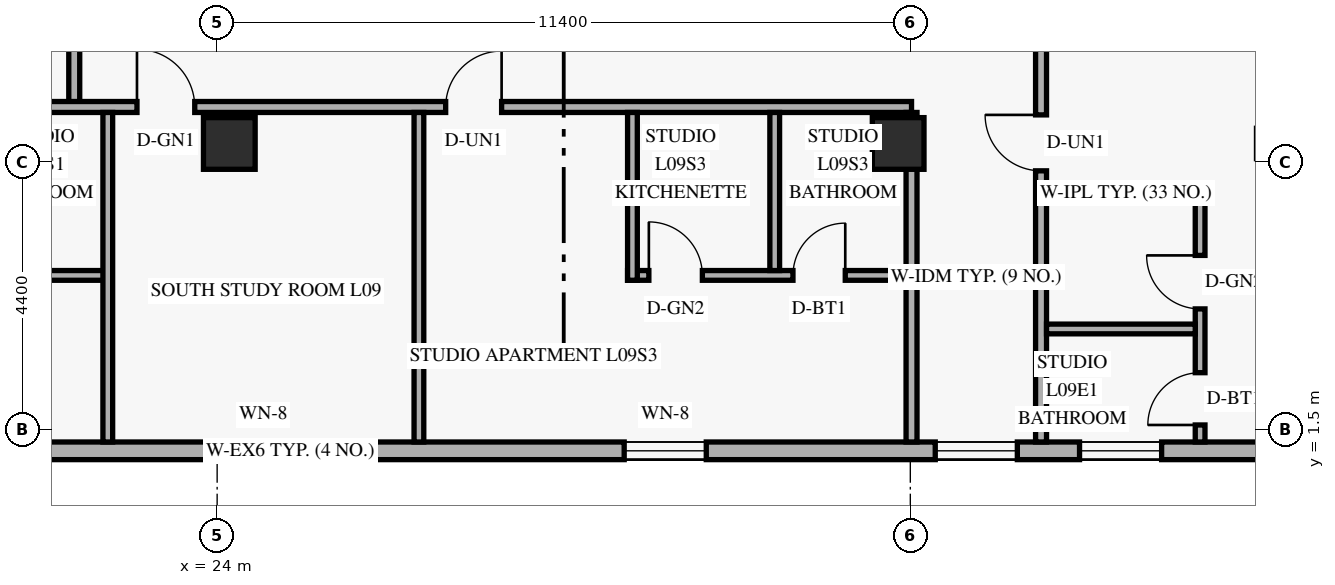
"""IFC4 building model, lengths in metres.
Left out: names, types, materials, properties, quantities, classifications, styles, units other than length and angle.
Written with IfcOpenShell. Run it as: python <this file> out.ifc"""

import sys

from ifc_helpers import new_model, si_unit, direction, frame, frame_2d, origin, origin_2d, place, context, subcontext, project, spatial, rectangle, hollow_rectangle, extrude, element, fill, save


model = new_model("IFC4")
c1 = context("Model", 3, precision=1e-05, world=origin(), true_north=direction((0.0, 1.0)))
c2 = subcontext(c1, "Body", "Model", "MODEL_VIEW")
j1 = project(units=[si_unit("LENGTHUNIT", "METRE"), si_unit("PLANEANGLEUNIT", "RADIAN")], contexts=[c1])
p1 = place(None, origin())
s1 = spatial("IfcSite", under=j1, at=p1, CompositionType="ELEMENT")
p2 = place(p1, origin())
s2 = spatial("IfcBuilding", under=s1, at=p2, CompositionType="ELEMENT")
p3 = place(p2, frame((0.0, 0.0, 38.4)))
s3 = spatial("IfcBuildingStorey", under=s2, at=p3, CompositionType="ELEMENT", Elevation=38.4)
for number, where, z_axis, x_axis in (
    (1, (24.2, 6.2, 0.0), (0.0, 0.0, 1.0), (1.0, 0.0, 0.0)),
    (2, (35.2, 6.2, 0.0), (0.0, 0.0, 1.0), (1.0, 0.0, 0.0)),
):
    element("IfcColumn", number, at=place(p3, frame(where, z_axis=z_axis, x_axis=x_axis)), inside=s3, PredefinedType="COLUMN", context=c2, shape_type="SweptSolid", body=[
        extrude(rectangle(XDim=0.85, YDim=0.85, at=origin_2d()), origin(), (0.0, 0.0, 1.0), 3.6),
    ])
p4 = place(p3, frame((41.28, 6.2, 0.0), z_axis=(0.034971136209, 0.0, 0.999388322742), x_axis=(0.0, 1.0, 0.0)))
e3 = element("IfcColumn", 3, at=p4, inside=s3, PredefinedType="COLUMN", context=c2, shape_type="SweptSolid", body=[
    extrude(hollow_rectangle(XDim=0.5, YDim=0.5, WallThickness=0.022, at=origin_2d()), origin(), (0.0, 0.0, 1.0), 3.602),
])
p5 = place(p3, frame((5.42, 1.145, 0.0), z_axis=(0.0, 0.0, 1.0), x_axis=(1.0, 0.0, 0.0)))
e4 = element("IfcWall", 4, at=p5, inside=s3, PredefinedType="SOLIDWALL", context=c2, shape_type="SweptSolid", body=[
    extrude(rectangle(XDim=39.56, YDim=0.29, at=frame_2d((19.78, 0.0))), origin(), (0.0, 0.0, 1.0), 3.36),
])
p6 = place(p5, frame((2.765, 0.0, 0.85)))
e5 = element("IfcOpeningElement", 5, at=p6, cuts=e4, PredefinedType="OPENING", context=c2, shape_type="SweptSolid", body=[
    extrude(rectangle(XDim=1.35, YDim=1.55, at=frame_2d((0.675, 0.775))), frame((0.0, 0.155, 0.0), z_axis=(0.0, -1.0, 0.0), x_axis=(1.0, 0.0, 0.0)), (0.0, 0.0, 1.0), 0.31),
])
p7 = place(p5, frame((7.18, 0.0, 0.85)))
e6 = element("IfcOpeningElement", 6, at=p7, cuts=e4, PredefinedType="OPENING", context=c2, shape_type="SweptSolid", body=[
    extrude(rectangle(XDim=1.2, YDim=1.5, at=frame_2d((0.6, 0.75))), frame((0.0, 0.155, 0.0), z_axis=(0.0, -1.0, 0.0), x_axis=(1.0, 0.0, 0.0)), (0.0, 0.0, 1.0), 0.31),
])
p8 = place(p5, frame((12.056, 0.0, 0.85)))
e7 = element("IfcOpeningElement", 7, at=p8, cuts=e4, PredefinedType="OPENING", context=c2, shape_type="SweptSolid", body=[
    extrude(rectangle(XDim=1.35, YDim=1.55, at=frame_2d((0.675, 0.775))), frame((0.0, 0.155, 0.0), z_axis=(0.0, -1.0, 0.0), x_axis=(1.0, 0.0, 0.0)), (0.0, 0.0, 1.0), 0.31),
])
p9 = place(p5, frame((18.665, 0.0, 0.85)))
e8 = element("IfcOpeningElement", 8, at=p9, cuts=e4, PredefinedType="OPENING", context=c2, shape_type="SweptSolid", body=[
    extrude(rectangle(XDim=1.35, YDim=1.55, at=frame_2d((0.675, 0.775))), frame((0.0, 0.155, 0.0), z_axis=(0.0, -1.0, 0.0), x_axis=(1.0, 0.0, 0.0)), (0.0, 0.0, 1.0), 0.31),
])
p10 = place(p5, frame((25.274, 0.0, 0.85)))
e9 = element("IfcOpeningElement", 9, at=p10, cuts=e4, PredefinedType="OPENING", context=c2, shape_type="SweptSolid", body=[
    extrude(rectangle(XDim=1.35, YDim=1.55, at=frame_2d((0.675, 0.775))), frame((0.0, 0.155, 0.0), z_axis=(0.0, -1.0, 0.0), x_axis=(1.0, 0.0, 0.0)), (0.0, 0.0, 1.0), 0.31),
])
p11 = place(p5, frame((30.39, 0.0, 0.85)))
e10 = element("IfcOpeningElement", 10, at=p11, cuts=e4, PredefinedType="OPENING", context=c2, shape_type="SweptSolid", body=[
    extrude(rectangle(XDim=1.35, YDim=1.55, at=frame_2d((0.675, 0.775))), frame((0.0, 0.155, 0.0), z_axis=(0.0, -1.0, 0.0), x_axis=(1.0, 0.0, 0.0)), (0.0, 0.0, 1.0), 0.31),
])
p12 = place(p5, frame((32.763, 0.0, 0.85)))
e11 = element("IfcOpeningElement", 11, at=p12, cuts=e4, PredefinedType="OPENING", context=c2, shape_type="SweptSolid", body=[
    extrude(rectangle(XDim=1.35, YDim=1.55, at=frame_2d((0.675, 0.775))), frame((0.0, 0.155, 0.0), z_axis=(0.0, -1.0, 0.0), x_axis=(1.0, 0.0, 0.0)), (0.0, 0.0, 1.0), 0.31),
])
p13 = place(p5, frame((36.478, 0.0, 0.85)))
e12 = element("IfcOpeningElement", 12, at=p13, cuts=e4, PredefinedType="OPENING", context=c2, shape_type="SweptSolid", body=[
    extrude(rectangle(XDim=1.35, YDim=1.55, at=frame_2d((0.675, 0.775))), frame((0.0, 0.155, 0.0), z_axis=(0.0, -1.0, 0.0), x_axis=(1.0, 0.0, 0.0)), (0.0, 0.0, 1.0), 0.31),
])
p14 = place(p3, frame((37.55, 1.29, 0.0), z_axis=(0.0, 0.0, 1.0), x_axis=(0.0, 1.0, 0.0)))
e13 = element("IfcWall", 13, at=p14, inside=s3, PredefinedType="STANDARD", context=c2, shape_type="SweptSolid", body=[
    extrude(rectangle(XDim=45.42, YDim=0.18, at=frame_2d((22.71, 0.0))), origin(), (0.0, 0.0, 1.0), 2.649),
])
p15 = place(p14, frame((4.46, 0.0, 0.0)))
e14 = element("IfcOpeningElement", 14, at=p15, cuts=e13, PredefinedType="OPENING", context=c2, shape_type="SweptSolid", body=[
    extrude(rectangle(XDim=0.92, YDim=2.15, at=frame_2d((0.46, 1.075))), frame((0.0, 0.1, 0.0), z_axis=(0.0, -1.0, 0.0), x_axis=(1.0, 0.0, 0.0)), (0.0, 0.0, 1.0), 0.2),
])
p16 = place(p14, frame((15.907, 0.0, 0.0)))
e15 = element("IfcOpeningElement", 15, at=p16, cuts=e13, PredefinedType="OPENING", context=c2, shape_type="SweptSolid", body=[
    extrude(rectangle(XDim=0.92, YDim=2.15, at=frame_2d((0.46, 1.075))), frame((0.0, 0.1, 0.0), z_axis=(0.0, -1.0, 0.0), x_axis=(1.0, 0.0, 0.0)), (0.0, 0.0, 1.0), 0.2),
])
p17 = place(p14, frame((28.23, 0.0, 0.0)))
e16 = element("IfcOpeningElement", 16, at=p17, cuts=e13, PredefinedType="OPENING", context=c2, shape_type="SweptSolid", body=[
    extrude(rectangle(XDim=0.92, YDim=2.15, at=frame_2d((0.46, 1.075))), frame((0.0, 0.1, 0.0), z_axis=(0.0, -1.0, 0.0), x_axis=(1.0, 0.0, 0.0)), (0.0, 0.0, 1.0), 0.2),
])
p18 = place(p14, frame((40.02, 0.0, 0.0)))
e17 = element("IfcOpeningElement", 17, at=p18, cuts=e13, PredefinedType="OPENING", context=c2, shape_type="SweptSolid", body=[
    extrude(rectangle(XDim=0.92, YDim=2.15, at=frame_2d((0.46, 1.075))), frame((0.0, 0.1, 0.0), z_axis=(0.0, -1.0, 0.0), x_axis=(1.0, 0.0, 0.0)), (0.0, 0.0, 1.0), 0.2),
])
p19 = place(p3, frame((21.65, 6.8, 0.0), z_axis=(0.0, 0.0, 1.0), x_axis=(0.0, 1.0, 0.0)))
e18 = element("IfcWall", 18, at=p19, inside=s3, PredefinedType="STANDARD", context=c2, shape_type="SweptSolid", body=[
    extrude(rectangle(XDim=34.4, YDim=0.18, at=frame_2d((17.2, 0.0))), origin(), (0.0, 0.0, 1.0), 2.649),
])
p20 = place(p3, frame((14.1, 6.8, 0.0), z_axis=(0.0, 0.0, 1.0), x_axis=(1.0, 0.0, 0.0)))
e19 = element("IfcWall", 19, at=p20, inside=s3, PredefinedType="STANDARD", context=c2, shape_type="SweptSolid", body=[
    extrude(rectangle(XDim=21.32, YDim=0.18, at=frame_2d((10.66, 0.0))), origin(), (0.0, 0.0, 1.0), 2.649),
])
p21 = place(p20, frame((0.44, 0.0, 0.0)))
e20 = element("IfcOpeningElement", 20, at=p21, cuts=e19, PredefinedType="OPENING", context=c2, shape_type="SweptSolid", body=[
    extrude(rectangle(XDim=0.92, YDim=2.15, at=frame_2d((0.46, 1.075))), frame((0.0, 0.1, 0.0), z_axis=(0.0, -1.0, 0.0), x_axis=(1.0, 0.0, 0.0)), (0.0, 0.0, 1.0), 0.2),
])
p22 = place(p20, frame((8.582, 0.0, 0.0)))
e21 = element("IfcOpeningElement", 21, at=p22, cuts=e19, PredefinedType="OPENING", context=c2, shape_type="SweptSolid", body=[
    extrude(rectangle(XDim=0.95, YDim=2.15, at=frame_2d((0.475, 1.075))), frame((0.0, 0.1, 0.0), z_axis=(0.0, -1.0, 0.0), x_axis=(1.0, 0.0, 0.0)), (0.0, 0.0, 1.0), 0.2),
])
p23 = place(p20, frame((13.658, 0.0, 0.0)))
e22 = element("IfcOpeningElement", 22, at=p23, cuts=e19, PredefinedType="OPENING", context=c2, shape_type="SweptSolid", body=[
    extrude(rectangle(XDim=0.92, YDim=2.15, at=frame_2d((0.46, 1.075))), frame((0.0, 0.1, 0.0), z_axis=(0.0, -1.0, 0.0), x_axis=(1.0, 0.0, 0.0)), (0.0, 0.0, 1.0), 0.2),
])
p24 = place(p3, frame((35.42, 1.29, 0.0), z_axis=(0.0, 0.0, 1.0), x_axis=(0.0, 1.0, 0.0)))
e23 = element("IfcWall", 23, at=p24, inside=s3, PredefinedType="PARTITIONING", context=c2, shape_type="SweptSolid", body=[
    extrude(rectangle(XDim=5.42, YDim=0.18, at=frame_2d((2.71, 0.0))), origin(), (0.0, 0.0, 1.0), 3.36),
])
p25 = place(p3, frame((37.64, 5.39, 0.0), z_axis=(0.0, 0.0, 1.0), x_axis=(1.0, 0.0, 0.0)))
e24 = element("IfcWall", 24, at=p25, inside=s3, PredefinedType="PLUMBINGWALL", context=c2, shape_type="SweptSolid", body=[
    extrude(rectangle(XDim=2.606, YDim=0.16, at=frame_2d((1.303, 0.0))), origin(), (0.0, 0.0, 1.0), 3.36),
])
p26 = place(p3, frame((40.166, 1.29, 0.0), z_axis=(0.0, 0.0, 1.0), x_axis=(0.0, 1.0, 0.0)))
e25 = element("IfcWall", 25, at=p26, inside=s3, PredefinedType="PLUMBINGWALL", context=c2, shape_type="SweptSolid", body=[
    extrude(rectangle(XDim=4.19, YDim=0.16, at=frame_2d((2.095, 0.0))), origin(), (0.0, 0.0, 1.0), 3.36),
])
p27 = place(p26, frame((0.28, 0.0, 0.0)))
e26 = element("IfcOpeningElement", 26, at=p27, cuts=e25, PredefinedType="OPENING", context=c2, shape_type="SweptSolid", body=[
    extrude(rectangle(XDim=0.86, YDim=2.12, at=frame_2d((0.43, 1.06))), frame((0.0, 0.09, 0.0), z_axis=(0.0, -1.0, 0.0), x_axis=(1.0, 0.0, 0.0)), (0.0, 0.0, 1.0), 0.18),
])
p28 = place(p26, frame((2.189, 0.0, 0.0)))
e27 = element("IfcOpeningElement", 27, at=p28, cuts=e25, PredefinedType="OPENING", context=c2, shape_type="SweptSolid", body=[
    extrude(rectangle(XDim=0.88, YDim=2.12, at=frame_2d((0.44, 1.06))), frame((0.0, 0.09, 0.0), z_axis=(0.0, -1.0, 0.0), x_axis=(1.0, 0.0, 0.0)), (0.0, 0.0, 1.0), 0.18),
])
p29 = place(p3, frame((37.64, 3.149, 0.0), z_axis=(0.0, 0.0, 1.0), x_axis=(1.0, 0.0, 0.0)))
e28 = element("IfcWall", 28, at=p29, inside=s3, PredefinedType="PLUMBINGWALL", context=c2, shape_type="SweptSolid", body=[
    extrude(rectangle(XDim=2.446, YDim=0.16, at=frame_2d((1.223, 0.0))), origin(), (0.0, 0.0, 1.0), 3.36),
])
p30 = place(p3, frame((17.531, 4.03, 0.0), z_axis=(0.0, 0.0, 1.0), x_axis=(1.0, 0.0, 0.0)))
e29 = element("IfcWall", 29, at=p30, inside=s3, PredefinedType="PLUMBINGWALL", context=c2, shape_type="SweptSolid", body=[
    extrude(rectangle(XDim=4.67, YDim=0.16, at=frame_2d((2.335, 0.0))), origin(), (0.0, 0.0, 1.0), 3.36),
])
p31 = place(p30, frame((0.35, 0.0, 0.0)))
e30 = element("IfcOpeningElement", 30, at=p31, cuts=e29, PredefinedType="OPENING", context=c2, shape_type="SweptSolid", body=[
    extrude(rectangle(XDim=0.88, YDim=2.12, at=frame_2d((0.44, 1.06))), frame((0.0, 0.09, 0.0), z_axis=(0.0, -1.0, 0.0), x_axis=(1.0, 0.0, 0.0)), (0.0, 0.0, 1.0), 0.18),
])
p32 = place(p30, frame((2.72, 0.0, 0.0)))
e31 = element("IfcOpeningElement", 31, at=p32, cuts=e29, PredefinedType="OPENING", context=c2, shape_type="SweptSolid", body=[
    extrude(rectangle(XDim=0.86, YDim=2.12, at=frame_2d((0.43, 1.06))), frame((0.0, 0.09, 0.0), z_axis=(0.0, -1.0, 0.0), x_axis=(1.0, 0.0, 0.0)), (0.0, 0.0, 1.0), 0.18),
])
for number, where, z_axis, x_axis in (
    (32, (22.202, 1.29, 0.0), (0.0, 0.0, 1.0), (0.0, 1.0, 0.0)),
    (33, (27.318, 1.29, 0.0), (0.0, 0.0, 1.0), (0.0, 1.0, 0.0)),
):
    element("IfcWall", number, at=place(p3, frame(where, z_axis=z_axis, x_axis=x_axis)), inside=s3, PredefinedType="PARTITIONING", context=c2, shape_type="SweptSolid", body=[
        extrude(rectangle(XDim=5.42, YDim=0.16, at=frame_2d((2.71, 0.0))), origin(), (0.0, 0.0, 1.0), 2.809),
    ])
p33 = place(p3, frame((30.75, 4.03, 0.0), z_axis=(0.0, 0.0, 1.0), x_axis=(1.0, 0.0, 0.0)))
e34 = element("IfcWall", 34, at=p33, inside=s3, PredefinedType="PLUMBINGWALL", context=c2, shape_type="SweptSolid", body=[
    extrude(rectangle(XDim=4.58, YDim=0.16, at=frame_2d((2.29, 0.0))), origin(), (0.0, 0.0, 1.0), 3.36),
])
p34 = place(p33, frame((0.35, 0.0, 0.0)))
e35 = element("IfcOpeningElement", 35, at=p34, cuts=e34, PredefinedType="OPENING", context=c2, shape_type="SweptSolid", body=[
    extrude(rectangle(XDim=0.88, YDim=2.12, at=frame_2d((0.44, 1.06))), frame((0.0, 0.09, 0.0), z_axis=(0.0, -1.0, 0.0), x_axis=(1.0, 0.0, 0.0)), (0.0, 0.0, 1.0), 0.18),
])
p35 = place(p33, frame((2.72, 0.0, 0.0)))
e36 = element("IfcOpeningElement", 36, at=p35, cuts=e34, PredefinedType="OPENING", context=c2, shape_type="SweptSolid", body=[
    extrude(rectangle(XDim=0.86, YDim=2.12, at=frame_2d((0.43, 1.06))), frame((0.0, 0.09, 0.0), z_axis=(0.0, -1.0, 0.0), x_axis=(1.0, 0.0, 0.0)), (0.0, 0.0, 1.0), 0.18),
])
p36 = place(p3, frame((30.83, 3.95, 0.0), z_axis=(0.0, 0.0, 1.0), x_axis=(0.0, 1.0, 0.0)))
e37 = element("IfcWall", 37, at=p36, inside=s3, PredefinedType="PLUMBINGWALL", context=c2, shape_type="SweptSolid", body=[
    extrude(rectangle(XDim=2.76, YDim=0.16, at=frame_2d((1.38, 0.0))), origin(), (0.0, 0.0, 1.0), 2.809),
])
p37 = place(p3, frame((33.17, 4.11, 0.0), z_axis=(0.0, 0.0, 1.0), x_axis=(0.0, 1.0, 0.0)))
e38 = element("IfcWall", 38, at=p37, inside=s3, PredefinedType="PLUMBINGWALL", context=c2, shape_type="SweptSolid", body=[
    extrude(rectangle(XDim=2.6, YDim=0.16, at=frame_2d((1.3, 0.0))), origin(), (0.0, 0.0, 1.0), 2.809),
])
p38 = place(p9, origin())
e39 = element("IfcWindow", 39, at=p38, inside=s3, PartitioningType="SINGLE_PANEL", PredefinedType="WINDOW", context=c2, shape_type="SweptSolid", body=[
    extrude(rectangle(XDim=1.35, YDim=1.55, at=frame_2d((0.675, 0.775))), frame((0.0, 0.03, 0.0), z_axis=(0.0, -1.0, 0.0), x_axis=(1.0, 0.0, 0.0)), (0.0, 0.0, 1.0), 0.06),
])
fill(e8, e39)
p39 = place(p10, origin())
e40 = element("IfcWindow", 40, at=p39, inside=s3, PartitioningType="SINGLE_PANEL", PredefinedType="WINDOW", context=c2, shape_type="SweptSolid", body=[
    extrude(rectangle(XDim=1.35, YDim=1.55, at=frame_2d((0.675, 0.775))), frame((0.0, 0.03, 0.0), z_axis=(0.0, -1.0, 0.0), x_axis=(1.0, 0.0, 0.0)), (0.0, 0.0, 1.0), 0.06),
])
fill(e9, e40)
p40 = place(p11, origin())
e41 = element("IfcWindow", 41, at=p40, inside=s3, PartitioningType="SINGLE_PANEL", PredefinedType="WINDOW", context=c2, shape_type="SweptSolid", body=[
    extrude(rectangle(XDim=1.35, YDim=1.55, at=frame_2d((0.675, 0.775))), frame((0.0, 0.03, 0.0), z_axis=(0.0, -1.0, 0.0), x_axis=(1.0, 0.0, 0.0)), (0.0, 0.0, 1.0), 0.06),
])
fill(e10, e41)
p41 = place(p12, origin())
e42 = element("IfcWindow", 42, at=p41, inside=s3, PartitioningType="SINGLE_PANEL", PredefinedType="WINDOW", context=c2, shape_type="SweptSolid", body=[
    extrude(rectangle(XDim=1.35, YDim=1.55, at=frame_2d((0.675, 0.775))), frame((0.0, 0.03, 0.0), z_axis=(0.0, -1.0, 0.0), x_axis=(1.0, 0.0, 0.0)), (0.0, 0.0, 1.0), 0.06),
])
fill(e11, e42)
p42 = place(p15, origin())
e43 = element("IfcDoor", 43, at=p42, inside=s3, OperationType="SINGLE_SWING_RIGHT", PredefinedType="DOOR", context=c2, shape_type="SweptSolid", body=[
    extrude(rectangle(XDim=0.92, YDim=2.15, at=frame_2d((0.46, 1.075))), frame((0.0, 0.025, 0.0), z_axis=(0.0, -1.0, 0.0), x_axis=(1.0, 0.0, 0.0)), (0.0, 0.0, 1.0), 0.05),
])
fill(e14, e43)
p43 = place(p27, origin())
e44 = element("IfcDoor", 44, at=p43, inside=s3, OperationType="SINGLE_SWING_LEFT", PredefinedType="DOOR", context=c2, shape_type="SweptSolid", body=[
    extrude(rectangle(XDim=0.86, YDim=2.12, at=frame_2d((0.43, 1.06))), frame((0.0, 0.025, 0.0), z_axis=(0.0, -1.0, 0.0), x_axis=(1.0, 0.0, 0.0)), (0.0, 0.0, 1.0), 0.05),
])
fill(e26, e44)
p44 = place(p28, origin())
e45 = element("IfcDoor", 45, at=p44, inside=s3, OperationType="SINGLE_SWING_RIGHT", PredefinedType="DOOR", context=c2, shape_type="SweptSolid", body=[
    extrude(rectangle(XDim=0.88, YDim=2.12, at=frame_2d((0.44, 1.06))), frame((0.0, 0.025, 0.0), z_axis=(0.0, -1.0, 0.0), x_axis=(1.0, 0.0, 0.0)), (0.0, 0.0, 1.0), 0.05),
])
fill(e27, e45)
p45 = place(p22, origin())
e46 = element("IfcDoor", 46, at=p45, inside=s3, OperationType="SINGLE_SWING_LEFT", PredefinedType="DOOR", context=c2, shape_type="SweptSolid", body=[
    extrude(rectangle(XDim=0.95, YDim=2.15, at=frame_2d((0.475, 1.075))), frame((0.0, 0.025, 0.0), z_axis=(0.0, -1.0, 0.0), x_axis=(1.0, 0.0, 0.0)), (0.0, 0.0, 1.0), 0.05),
])
fill(e21, e46)
p46 = place(p23, origin())
e47 = element("IfcDoor", 47, at=p46, inside=s3, OperationType="SINGLE_SWING_RIGHT", PredefinedType="DOOR", context=c2, shape_type="SweptSolid", body=[
    extrude(rectangle(XDim=0.92, YDim=2.15, at=frame_2d((0.46, 1.075))), frame((0.0, 0.025, 0.0), z_axis=(0.0, -1.0, 0.0), x_axis=(1.0, 0.0, 0.0)), (0.0, 0.0, 1.0), 0.05),
])
fill(e22, e47)
p47 = place(p34, origin())
e48 = element("IfcDoor", 48, at=p47, inside=s3, OperationType="SINGLE_SWING_LEFT", PredefinedType="DOOR", context=c2, shape_type="SweptSolid", body=[
    extrude(rectangle(XDim=0.88, YDim=2.12, at=frame_2d((0.44, 1.06))), frame((0.0, 0.025, 0.0), z_axis=(0.0, -1.0, 0.0), x_axis=(1.0, 0.0, 0.0)), (0.0, 0.0, 1.0), 0.05),
])
fill(e35, e48)
p48 = place(p35, origin())
e49 = element("IfcDoor", 49, at=p48, inside=s3, OperationType="SINGLE_SWING_RIGHT", PredefinedType="DOOR", context=c2, shape_type="SweptSolid", body=[
    extrude(rectangle(XDim=0.86, YDim=2.12, at=frame_2d((0.43, 1.06))), frame((0.0, 0.025, 0.0), z_axis=(0.0, -1.0, 0.0), x_axis=(1.0, 0.0, 0.0)), (0.0, 0.0, 1.0), 0.05),
])
fill(e36, e49)
save(model, sys.argv[1])
